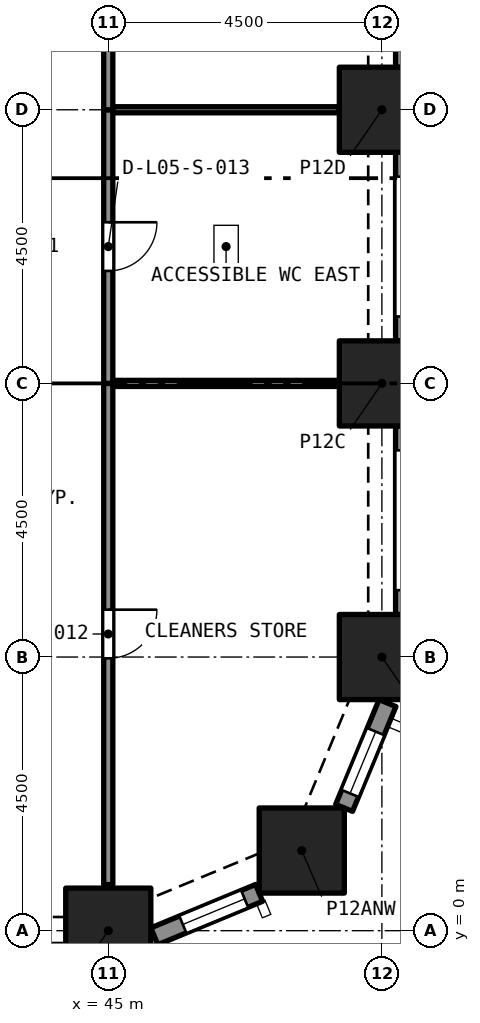
"""IFC4 building model, lengths in metres.
Left out: names, types, materials, properties, quantities, classifications, styles, units other than length and angle.
Written with IfcOpenShell. Run it as: python <this file> out.ifc"""

import sys

from ifc_helpers import new_model, si_unit, direction, frame, frame_2d, origin, origin_2d, place, context, subcontext, project, spatial, rectangle, extrude, element, fill, save


model = new_model("IFC4")
c1 = context("Model", 3, precision=1e-05, world=origin(), true_north=direction((0.0, 1.0)))
c2 = subcontext(c1, "Body", "Model", "MODEL_VIEW")
j1 = project(units=[si_unit("LENGTHUNIT", "METRE"), si_unit("PLANEANGLEUNIT", "RADIAN")], contexts=[c1])
p1 = place(None, origin())
s1 = spatial("IfcSite", under=j1, at=p1, CompositionType="ELEMENT")
p2 = place(p1, origin())
s2 = spatial("IfcBuilding", under=s1, at=p2, CompositionType="ELEMENT")
p3 = place(p2, frame((0.0, 0.0, 26.0)))
s3 = spatial("IfcBuildingStorey", under=s2, at=p3, CompositionType="ELEMENT", Elevation=26.0)
for number, where, z_axis, x_axis in (
    (1, (45.0, 0.0, 0.0), (0.0, 0.0, 1.0), (1.0, 0.0, 0.0)),
    (2, (48.182, 1.318, 0.0), (0.0, 0.0, 1.0), (1.0, 0.0, 0.0)),
    (3, (49.5, 4.5, 0.0), (0.0, 0.0, 1.0), (1.0, 0.0, 0.0)),
    (4, (49.5, 9.0, 0.0), (0.0, 0.0, 1.0), (1.0, 0.0, 0.0)),
    (5, (49.5, 13.5, 0.0), (0.0, 0.0, 1.0), (1.0, 0.0, 0.0)),
):
    element("IfcColumn", number, at=place(p3, frame(where, z_axis=z_axis, x_axis=x_axis)), inside=s3, PredefinedType="COLUMN", context=c2, shape_type="SweptSolid", body=[
        extrude(rectangle(XDim=1.4, YDim=1.4, at=origin_2d()), origin(), (0.0, 0.0, 1.0), 4.4),
    ])
p4 = place(p3, frame((47.48, 0.622, 0.0), z_axis=(0.0, 0.0, 1.0), x_axis=(-0.923903565336, -0.38262540684, 0.0)))
e6 = element("IfcWall", 6, at=p4, inside=s3, PredefinedType="SOLIDWALL", context=c2, shape_type="SweptSolid", body=[
    extrude(rectangle(XDim=1.865, YDim=0.3, at=frame_2d((0.933, 0.0))), origin(), (0.0, 0.0, 1.0), 4.4),
])
p5 = place(p4, frame((0.258, 0.0, 0.45)))
e7 = element("IfcOpeningElement", 7, at=p5, cuts=e6, PredefinedType="OPENING", context=c2, shape_type="SweptSolid", body=[
    extrude(rectangle(XDim=1.1, YDim=2.55, at=frame_2d((0.55, 1.275))), frame((0.0, 0.16, 0.0), z_axis=(0.0, -1.0, 0.0), x_axis=(1.0, 0.0, 0.0)), (0.0, 0.0, 1.0), 0.32),
])
p6 = place(p3, frame((49.592, 3.743, 0.0), z_axis=(0.0, 0.0, 1.0), x_axis=(-0.382737135771, -0.923857286003, 0.0)))
e8 = element("IfcWall", 8, at=p6, inside=s3, PredefinedType="SOLIDWALL", context=c2, shape_type="SweptSolid", body=[
    extrude(rectangle(XDim=1.865, YDim=0.3, at=frame_2d((0.933, 0.0))), origin(), (0.0, 0.0, 1.0), 4.4),
])
p7 = place(p6, frame((0.508, 0.0, 0.45)))
e9 = element("IfcOpeningElement", 9, at=p7, cuts=e8, PredefinedType="OPENING", context=c2, shape_type="SweptSolid", body=[
    extrude(rectangle(XDim=1.1, YDim=2.55, at=frame_2d((0.55, 1.275))), frame((0.0, 0.16, 0.0), z_axis=(0.0, -1.0, 0.0), x_axis=(1.0, 0.0, 0.0)), (0.0, 0.0, 1.0), 0.32),
])
p8 = place(p3, frame((49.875, 8.3, 0.0), z_axis=(0.0, 0.0, 1.0), x_axis=(0.0, -1.0, 0.0)))
e10 = element("IfcWall", 10, at=p8, inside=s3, PredefinedType="SOLIDWALL", context=c2, shape_type="SweptSolid", body=[
    extrude(rectangle(XDim=3.1, YDim=0.3, at=frame_2d((1.55, 0.0))), origin(), (0.0, 0.0, 1.0), 4.4),
])
p9 = place(p8, frame((0.4, 0.0, 0.45)))
e11 = element("IfcOpeningElement", 11, at=p9, cuts=e10, PredefinedType="OPENING", context=c2, shape_type="SweptSolid", body=[
    extrude(rectangle(XDim=2.3, YDim=2.55, at=frame_2d((1.15, 1.275))), frame((0.0, 0.16, 0.0), z_axis=(0.0, -1.0, 0.0), x_axis=(1.0, 0.0, 0.0)), (0.0, 0.0, 1.0), 0.32),
])
p10 = place(p3, frame((49.875, 12.8, 0.0), z_axis=(0.0, 0.0, 1.0), x_axis=(0.0, -1.0, 0.0)))
e12 = element("IfcWall", 12, at=p10, inside=s3, PredefinedType="SOLIDWALL", context=c2, shape_type="SweptSolid", body=[
    extrude(rectangle(XDim=3.1, YDim=0.3, at=frame_2d((1.55, 0.0))), origin(), (0.0, 0.0, 1.0), 4.4),
])
p11 = place(p10, frame((0.4, 0.0, 0.45)))
e13 = element("IfcOpeningElement", 13, at=p11, cuts=e12, PredefinedType="OPENING", context=c2, shape_type="SweptSolid", body=[
    extrude(rectangle(XDim=2.3, YDim=2.55, at=frame_2d((1.15, 1.275))), frame((0.0, 0.16, 0.0), z_axis=(0.0, -1.0, 0.0), x_axis=(1.0, 0.0, 0.0)), (0.0, 0.0, 1.0), 0.32),
])
p12 = place(p3, frame((49.875, 17.3, 0.0), z_axis=(0.0, 0.0, 1.0), x_axis=(0.0, -1.0, 0.0)))
e14 = element("IfcWall", 14, at=p12, inside=s3, PredefinedType="SOLIDWALL", context=c2, shape_type="SweptSolid", body=[
    extrude(rectangle(XDim=3.1, YDim=0.3, at=frame_2d((1.55, 0.0))), origin(), (0.0, 0.0, 1.0), 4.4),
])
p13 = place(p12, frame((0.4, 0.0, 0.45)))
e15 = element("IfcOpeningElement", 15, at=p13, cuts=e14, PredefinedType="OPENING", context=c2, shape_type="SweptSolid", body=[
    extrude(rectangle(XDim=2.3, YDim=2.55, at=frame_2d((1.15, 1.275))), frame((0.0, 0.16, 0.0), z_axis=(0.0, -1.0, 0.0), x_axis=(1.0, 0.0, 0.0)), (0.0, 0.0, 1.0), 0.32),
])
p14 = place(p3, frame((45.0, 9.0, 0.0), z_axis=(0.0, 0.0, 1.0), x_axis=(0.0, -1.0, 0.0)))
e16 = element("IfcWall", 16, at=p14, inside=s3, PredefinedType="PARTITIONING", context=c2, shape_type="SweptSolid", body=[
    extrude(rectangle(XDim=8.242, YDim=0.15, at=frame_2d((4.121, 0.0))), origin(), (0.0, 0.0, 1.0), 4.1),
])
p15 = place(p14, frame((3.721, 0.0, 0.0)))
e17 = element("IfcOpeningElement", 17, at=p15, cuts=e16, PredefinedType="OPENING", context=c2, shape_type="SweptSolid", body=[
    extrude(rectangle(XDim=0.8, YDim=2.1, at=frame_2d((0.4, 1.05))), frame((0.0, 0.085, 0.0), z_axis=(0.0, -1.0, 0.0), x_axis=(1.0, 0.0, 0.0)), (0.0, 0.0, 1.0), 0.17),
])
p16 = place(p3, frame((45.0, 13.5, 0.0), z_axis=(0.0, 0.0, 1.0), x_axis=(0.0, -1.0, 0.0)))
e18 = element("IfcWall", 18, at=p16, inside=s3, PredefinedType="PARTITIONING", context=c2, shape_type="SweptSolid", body=[
    extrude(rectangle(XDim=4.5, YDim=0.15, at=frame_2d((2.25, 0.0))), origin(), (0.0, 0.0, 1.0), 4.1),
])
p17 = place(p16, frame((1.85, 0.0, 0.0)))
e19 = element("IfcOpeningElement", 19, at=p17, cuts=e18, PredefinedType="OPENING", context=c2, shape_type="SweptSolid", body=[
    extrude(rectangle(XDim=0.8, YDim=2.1, at=frame_2d((0.4, 1.05))), frame((0.0, 0.085, 0.0), z_axis=(0.0, -1.0, 0.0), x_axis=(1.0, 0.0, 0.0)), (0.0, 0.0, 1.0), 0.17),
])
p18 = place(p3, frame((45.0, 22.575, 0.0), z_axis=(0.0, 0.0, 1.0), x_axis=(0.0, -1.0, 0.0)))
e20 = element("IfcWall", 20, at=p18, inside=s3, PredefinedType="PARTITIONING", context=c2, shape_type="SweptSolid", body=[
    extrude(rectangle(XDim=9.075, YDim=0.15, at=frame_2d((4.538, 0.0))), origin(), (0.0, 0.0, 1.0), 4.1),
])
p19 = place(p18, frame((4.175, 0.0, 0.0)))
e21 = element("IfcOpeningElement", 21, at=p19, cuts=e20, PredefinedType="OPENING", context=c2, shape_type="SweptSolid", body=[
    extrude(rectangle(XDim=0.8, YDim=2.1, at=frame_2d((0.4, 1.05))), frame((0.0, 0.085, 0.0), z_axis=(0.0, -1.0, 0.0), x_axis=(1.0, 0.0, 0.0)), (0.0, 0.0, 1.0), 0.17),
])
for number, where, z_axis, x_axis in (
    (22, (45.075, 9.0, 0.0), (0.0, 0.0, 1.0), (1.0, 0.0, 0.0)),
    (23, (45.075, 13.5, 0.0), (0.0, 0.0, 1.0), (1.0, 0.0, 0.0)),
):
    element("IfcWall", number, at=place(p3, frame(where, z_axis=z_axis, x_axis=x_axis)), inside=s3, PredefinedType="PARTITIONING", context=c2, shape_type="SweptSolid", body=[
        extrude(rectangle(XDim=3.725, YDim=0.1, at=frame_2d((1.863, 0.0))), origin(), (0.0, 0.0, 1.0), 4.1),
    ])
p20 = place(p5, origin())
e24 = element("IfcWindow", 24, at=p20, inside=s3, PartitioningType="SINGLE_PANEL", PredefinedType="WINDOW", context=c2, shape_type="SweptSolid", body=[
    extrude(rectangle(XDim=1.1, YDim=2.55, at=frame_2d((0.55, 1.275))), frame((0.0, 0.03, 0.0), z_axis=(0.0, -1.0, 0.0), x_axis=(1.0, 0.0, 0.0)), (0.0, 0.0, 1.0), 0.06),
])
fill(e7, e24)
p21 = place(p7, origin())
e25 = element("IfcWindow", 25, at=p21, inside=s3, PartitioningType="SINGLE_PANEL", PredefinedType="WINDOW", context=c2, shape_type="SweptSolid", body=[
    extrude(rectangle(XDim=1.1, YDim=2.55, at=frame_2d((0.55, 1.275))), frame((0.0, 0.03, 0.0), z_axis=(0.0, -1.0, 0.0), x_axis=(1.0, 0.0, 0.0)), (0.0, 0.0, 1.0), 0.06),
])
fill(e9, e25)
p22 = place(p15, origin())
e26 = element("IfcDoor", 26, at=p22, inside=s3, OperationType="SINGLE_SWING_RIGHT", PredefinedType="DOOR", context=c2, shape_type="SweptSolid", body=[
    extrude(rectangle(XDim=0.8, YDim=2.1, at=frame_2d((0.4, 1.05))), frame((0.0, 0.025, 0.0), z_axis=(0.0, -1.0, 0.0), x_axis=(1.0, 0.0, 0.0)), (0.0, 0.0, 1.0), 0.05),
])
fill(e17, e26)
p23 = place(p17, origin())
e27 = element("IfcDoor", 27, at=p23, inside=s3, OperationType="SINGLE_SWING_RIGHT", PredefinedType="DOOR", context=c2, shape_type="SweptSolid", body=[
    extrude(rectangle(XDim=0.8, YDim=2.1, at=frame_2d((0.4, 1.05))), frame((0.0, 0.025, 0.0), z_axis=(0.0, -1.0, 0.0), x_axis=(1.0, 0.0, 0.0)), (0.0, 0.0, 1.0), 0.05),
])
fill(e19, e27)
save(model, sys.argv[1])
